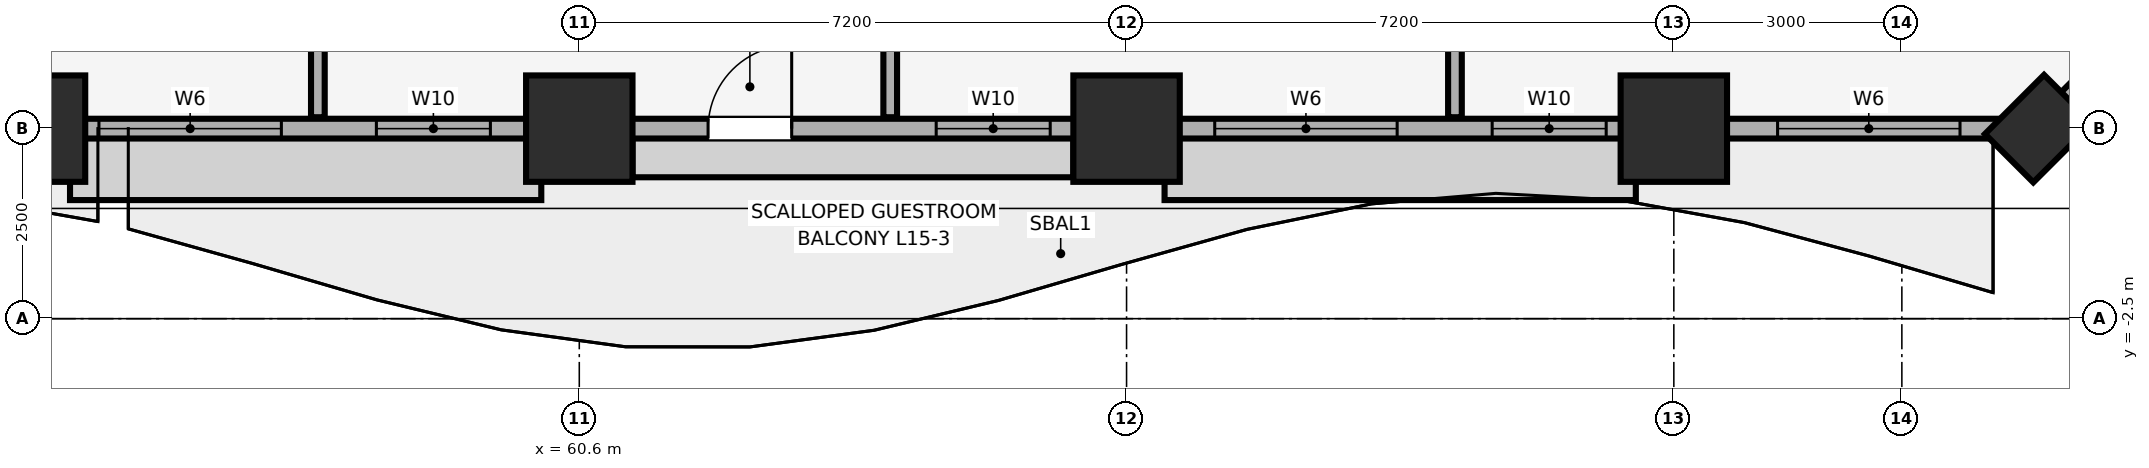
"""IFC4 building model, lengths in metres.
Left out: names, types, materials, properties, quantities, classifications, styles, units other than length and angle.
Written with IfcOpenShell. Run it as: python <this file> out.ifc"""

import sys

from ifc_helpers import new_model, si_unit, direction, frame, frame_2d, origin, origin_2d, place, context, subcontext, project, spatial, rectangle, extrude, element, fill, save


model = new_model("IFC4")
c1 = context("Model", 3, precision=1e-05, world=origin(), true_north=direction((0.0, 1.0)))
c2 = subcontext(c1, "Body", "Model", "MODEL_VIEW")
j1 = project(units=[si_unit("LENGTHUNIT", "METRE"), si_unit("PLANEANGLEUNIT", "RADIAN")], contexts=[c1])
p1 = place(None, origin())
s1 = spatial("IfcSite", under=j1, at=p1, CompositionType="ELEMENT")
p2 = place(p1, origin())
s2 = spatial("IfcBuilding", under=s1, at=p2, CompositionType="ELEMENT")
p3 = place(p2, frame((0.0, 0.0, 68.9)))
s3 = spatial("IfcBuildingStorey", under=s2, at=p3, CompositionType="ELEMENT", Elevation=68.9)
for number, where, z_axis, x_axis in (
    (1, (53.4, 0.0, 0.0), (0.0, 0.0, 1.0), (1.0, 0.0, 0.0)),
    (2, (60.6, 0.0, 0.0), (0.0, 0.0, 1.0), (1.0, 0.0, 0.0)),
    (3, (67.8, 0.0, 0.0), (0.0, 0.0, 1.0), (1.0, 0.0, 0.0)),
    (4, (75.0, 0.0, 0.0), (0.0, 0.0, 1.0), (1.0, 0.0, 0.0)),
):
    element("IfcColumn", number, at=place(p3, frame(where, z_axis=z_axis, x_axis=x_axis)), inside=s3, PredefinedType="COLUMN", context=c2, shape_type="SweptSolid", body=[
        extrude(rectangle(XDim=1.4, YDim=1.4, at=origin_2d()), origin(), (0.0, 0.0, 1.0), 3.51),
    ])
p4 = place(p3, frame((79.8, 0.0, 0.0), z_axis=(0.0, 0.0, 1.0), x_axis=(0.707106781187, 0.707106781187, 0.0)))
e5 = element("IfcColumn", 5, at=p4, inside=s3, PredefinedType="PILASTER", context=c2, shape_type="SweptSolid", body=[
    extrude(rectangle(XDim=1.1, YDim=0.9, at=origin_2d()), origin(), (0.0, 0.0, 1.0), 3.51),
])
p5 = place(p3, frame((4.2, 0.0, 0.0), z_axis=(0.0, 0.0, 1.0), x_axis=(1.0, 0.0, 0.0)))
e6 = element("IfcWall", 6, at=p5, inside=s3, PredefinedType="SOLIDWALL", context=c2, shape_type="SweptSolid", body=[
    extrude(rectangle(XDim=75.6, YDim=0.26, at=frame_2d((37.8, 0.0))), origin(), (0.0, 0.0, 1.0), 2.56),
])
p6 = place(p5, frame((13.517, 0.0, 0.0)))
e7 = element("IfcOpeningElement", 7, at=p6, cuts=e6, PredefinedType="OPENING", context=c2, shape_type="SweptSolid", body=[
    extrude(rectangle(XDim=1.1, YDim=2.15, at=frame_2d((0.55, 1.075))), frame((0.0, 0.14, 0.0), z_axis=(0.0, -1.0, 0.0), x_axis=(1.0, 0.0, 0.0)), (0.0, 0.0, 1.0), 0.28),
])
p7 = place(p5, frame((28.183, 0.0, 0.0)))
e8 = element("IfcOpeningElement", 8, at=p7, cuts=e6, PredefinedType="OPENING", context=c2, shape_type="SweptSolid", body=[
    extrude(rectangle(XDim=1.1, YDim=2.15, at=frame_2d((0.55, 1.075))), frame((0.0, 0.14, 0.0), z_axis=(0.0, -1.0, 0.0), x_axis=(1.0, 0.0, 0.0)), (0.0, 0.0, 1.0), 0.28),
])
p8 = place(p5, frame((58.094, 0.0, 0.0)))
e9 = element("IfcOpeningElement", 9, at=p8, cuts=e6, PredefinedType="OPENING", context=c2, shape_type="SweptSolid", body=[
    extrude(rectangle(XDim=1.1, YDim=2.15, at=frame_2d((0.55, 1.075))), frame((0.0, 0.14, 0.0), z_axis=(0.0, -1.0, 0.0), x_axis=(1.0, 0.0, 0.0)), (0.0, 0.0, 1.0), 0.28),
])
p9 = place(p5, frame((1.035, 0.0, 0.85)))
e10 = element("IfcOpeningElement", 10, at=p9, cuts=e6, PredefinedType="OPENING", context=c2, shape_type="SweptSolid", body=[
    extrude(rectangle(XDim=2.4, YDim=1.5, at=frame_2d((1.2, 0.75))), frame((0.0, 0.14, 0.0), z_axis=(0.0, -1.0, 0.0), x_axis=(1.0, 0.0, 0.0)), (0.0, 0.0, 1.0), 0.28),
])
p10 = place(p5, frame((5.74, 0.0, 0.85)))
e11 = element("IfcOpeningElement", 11, at=p10, cuts=e6, PredefinedType="OPENING", context=c2, shape_type="SweptSolid", body=[
    extrude(rectangle(XDim=1.5, YDim=1.4, at=frame_2d((0.75, 0.7))), frame((0.0, 0.14, 0.0), z_axis=(0.0, -1.0, 0.0), x_axis=(1.0, 0.0, 0.0)), (0.0, 0.0, 1.0), 0.28),
])
p11 = place(p5, frame((8.49, 0.0, 0.85)))
e12 = element("IfcOpeningElement", 12, at=p11, cuts=e6, PredefinedType="OPENING", context=c2, shape_type="SweptSolid", body=[
    extrude(rectangle(XDim=2.4, YDim=1.5, at=frame_2d((1.2, 0.75))), frame((0.0, 0.14, 0.0), z_axis=(0.0, -1.0, 0.0), x_axis=(1.0, 0.0, 0.0)), (0.0, 0.0, 1.0), 0.28),
])
p12 = place(p5, frame((15.855, 0.0, 0.85)))
e13 = element("IfcOpeningElement", 13, at=p12, cuts=e6, PredefinedType="OPENING", context=c2, shape_type="SweptSolid", body=[
    extrude(rectangle(XDim=2.4, YDim=1.5, at=frame_2d((1.2, 0.75))), frame((0.0, 0.14, 0.0), z_axis=(0.0, -1.0, 0.0), x_axis=(1.0, 0.0, 0.0)), (0.0, 0.0, 1.0), 0.28),
])
p13 = place(p5, frame((20.02, 0.0, 0.85)))
e14 = element("IfcOpeningElement", 14, at=p13, cuts=e6, PredefinedType="OPENING", context=c2, shape_type="SweptSolid", body=[
    extrude(rectangle(XDim=2.4, YDim=1.5, at=frame_2d((1.2, 0.75))), frame((0.0, 0.14, 0.0), z_axis=(0.0, -1.0, 0.0), x_axis=(1.0, 0.0, 0.0)), (0.0, 0.0, 1.0), 0.28),
])
p14 = place(p5, frame((23.67, 0.0, 0.85)))
e15 = element("IfcOpeningElement", 15, at=p14, cuts=e6, PredefinedType="OPENING", context=c2, shape_type="SweptSolid", body=[
    extrude(rectangle(XDim=1.5, YDim=1.4, at=frame_2d((0.75, 0.7))), frame((0.0, 0.14, 0.0), z_axis=(0.0, -1.0, 0.0), x_axis=(1.0, 0.0, 0.0)), (0.0, 0.0, 1.0), 0.28),
])
p15 = place(p5, frame((31.035, 0.0, 0.85)))
e16 = element("IfcOpeningElement", 16, at=p15, cuts=e6, PredefinedType="OPENING", context=c2, shape_type="SweptSolid", body=[
    extrude(rectangle(XDim=1.5, YDim=1.4, at=frame_2d((0.75, 0.7))), frame((0.0, 0.14, 0.0), z_axis=(0.0, -1.0, 0.0), x_axis=(1.0, 0.0, 0.0)), (0.0, 0.0, 1.0), 0.28),
])
p16 = place(p5, frame((34.75, 0.0, 0.85)))
e17 = element("IfcOpeningElement", 17, at=p16, cuts=e6, PredefinedType="OPENING", context=c2, shape_type="SweptSolid", body=[
    extrude(rectangle(XDim=2.4, YDim=1.5, at=frame_2d((1.2, 0.75))), frame((0.0, 0.14, 0.0), z_axis=(0.0, -1.0, 0.0), x_axis=(1.0, 0.0, 0.0)), (0.0, 0.0, 1.0), 0.28),
])
p17 = place(p5, frame((38.55, 0.0, 0.85)))
e18 = element("IfcOpeningElement", 18, at=p17, cuts=e6, PredefinedType="OPENING", context=c2, shape_type="SweptSolid", body=[
    extrude(rectangle(XDim=2.4, YDim=1.5, at=frame_2d((1.2, 0.75))), frame((0.0, 0.14, 0.0), z_axis=(0.0, -1.0, 0.0), x_axis=(1.0, 0.0, 0.0)), (0.0, 0.0, 1.0), 0.28),
])
p18 = place(p5, frame((43.165, 0.0, 0.85)))
e19 = element("IfcOpeningElement", 19, at=p18, cuts=e6, PredefinedType="OPENING", context=c2, shape_type="SweptSolid", body=[
    extrude(rectangle(XDim=1.5, YDim=1.4, at=frame_2d((0.75, 0.7))), frame((0.0, 0.14, 0.0), z_axis=(0.0, -1.0, 0.0), x_axis=(1.0, 0.0, 0.0)), (0.0, 0.0, 1.0), 0.28),
])
p19 = place(p5, frame((45.915, 0.0, 0.85)))
e20 = element("IfcOpeningElement", 20, at=p19, cuts=e6, PredefinedType="OPENING", context=c2, shape_type="SweptSolid", body=[
    extrude(rectangle(XDim=2.4, YDim=1.5, at=frame_2d((1.2, 0.75))), frame((0.0, 0.14, 0.0), z_axis=(0.0, -1.0, 0.0), x_axis=(1.0, 0.0, 0.0)), (0.0, 0.0, 1.0), 0.28),
])
p20 = place(p5, frame((50.081, 0.0, 0.85)))
e21 = element("IfcOpeningElement", 21, at=p20, cuts=e6, PredefinedType="OPENING", context=c2, shape_type="SweptSolid", body=[
    extrude(rectangle(XDim=2.4, YDim=1.5, at=frame_2d((1.2, 0.75))), frame((0.0, 0.14, 0.0), z_axis=(0.0, -1.0, 0.0), x_axis=(1.0, 0.0, 0.0)), (0.0, 0.0, 1.0), 0.28),
])
p21 = place(p5, frame((53.73, 0.0, 0.85)))
e22 = element("IfcOpeningElement", 22, at=p21, cuts=e6, PredefinedType="OPENING", context=c2, shape_type="SweptSolid", body=[
    extrude(rectangle(XDim=1.5, YDim=1.4, at=frame_2d((0.75, 0.7))), frame((0.0, 0.14, 0.0), z_axis=(0.0, -1.0, 0.0), x_axis=(1.0, 0.0, 0.0)), (0.0, 0.0, 1.0), 0.28),
])
p22 = place(p5, frame((61.095, 0.0, 0.85)))
e23 = element("IfcOpeningElement", 23, at=p22, cuts=e6, PredefinedType="OPENING", context=c2, shape_type="SweptSolid", body=[
    extrude(rectangle(XDim=1.5, YDim=1.4, at=frame_2d((0.75, 0.7))), frame((0.0, 0.14, 0.0), z_axis=(0.0, -1.0, 0.0), x_axis=(1.0, 0.0, 0.0)), (0.0, 0.0, 1.0), 0.28),
])
p23 = place(p5, frame((64.76, 0.0, 0.85)))
e24 = element("IfcOpeningElement", 24, at=p23, cuts=e6, PredefinedType="OPENING", context=c2, shape_type="SweptSolid", body=[
    extrude(rectangle(XDim=2.4, YDim=1.5, at=frame_2d((1.2, 0.75))), frame((0.0, 0.14, 0.0), z_axis=(0.0, -1.0, 0.0), x_axis=(1.0, 0.0, 0.0)), (0.0, 0.0, 1.0), 0.28),
])
p24 = place(p5, frame((68.41, 0.0, 0.85)))
e25 = element("IfcOpeningElement", 25, at=p24, cuts=e6, PredefinedType="OPENING", context=c2, shape_type="SweptSolid", body=[
    extrude(rectangle(XDim=1.5, YDim=1.4, at=frame_2d((0.75, 0.7))), frame((0.0, 0.14, 0.0), z_axis=(0.0, -1.0, 0.0), x_axis=(1.0, 0.0, 0.0)), (0.0, 0.0, 1.0), 0.28),
])
p25 = place(p5, frame((72.165, 0.0, 0.85)))
e26 = element("IfcOpeningElement", 26, at=p25, cuts=e6, PredefinedType="OPENING", context=c2, shape_type="SweptSolid", body=[
    extrude(rectangle(XDim=2.4, YDim=1.5, at=frame_2d((1.2, 0.75))), frame((0.0, 0.14, 0.0), z_axis=(0.0, -1.0, 0.0), x_axis=(1.0, 0.0, 0.0)), (0.0, 0.0, 1.0), 0.28),
])
p26 = place(p3, frame((79.8, 0.0, 0.0), z_axis=(0.0, 0.0, 1.0), x_axis=(0.707106781187, 0.707106781187, 0.0)))
e27 = element("IfcWall", 27, at=p26, inside=s3, PredefinedType="SOLIDWALL", context=c2, shape_type="SweptSolid", body=[
    extrude(rectangle(XDim=5.94, YDim=0.26, at=frame_2d((2.97, 0.0))), origin(), (0.0, 0.0, 1.0), 2.56),
])
p27 = place(p3, frame((57.161, 0.15, 0.0), z_axis=(0.0, 0.0, 1.0), x_axis=(0.0, 1.0, 0.0)))
e28 = element("IfcWall", 28, at=p27, inside=s3, PredefinedType="PARTITIONING", context=c2, shape_type="SweptSolid", body=[
    extrude(rectangle(XDim=12.755, YDim=0.18, at=frame_2d((6.377, 0.0))), origin(), (0.0, 0.0, 1.0), 2.898),
])
for number, where, z_axis, x_axis in (
    (29, (64.691, 0.15, 0.0), (0.0, 0.0, 1.0), (0.0, 1.0, 0.0)),
    (30, (72.12, 0.15, 0.0), (0.0, 0.0, 1.0), (0.0, 1.0, 0.0)),
):
    element("IfcWall", number, at=place(p3, frame(where, z_axis=z_axis, x_axis=x_axis)), inside=s3, PredefinedType="PARTITIONING", context=c2, shape_type="SweptSolid", body=[
        extrude(rectangle(XDim=12.755, YDim=0.18, at=frame_2d((6.377, 0.0))), origin(), (0.0, 0.0, 1.0), 3.51),
    ])
p28 = place(p8, origin())
e31 = element("IfcDoor", 31, at=p28, inside=s3, OperationType="SINGLE_SWING_RIGHT", PredefinedType="DOOR", context=c2, shape_type="SweptSolid", body=[
    extrude(rectangle(XDim=1.1, YDim=2.15, at=frame_2d((0.55, 1.075))), frame((0.0, 0.025, 0.0), z_axis=(0.0, -1.0, 0.0), x_axis=(1.0, 0.0, 0.0)), (0.0, 0.0, 1.0), 0.05),
])
fill(e9, e31)
p29 = place(p20, origin())
e32 = element("IfcWindow", 32, at=p29, inside=s3, PartitioningType="SINGLE_PANEL", PredefinedType="WINDOW", context=c2, shape_type="SweptSolid", body=[
    extrude(rectangle(XDim=2.4, YDim=1.5, at=frame_2d((1.2, 0.75))), frame((0.0, 0.03, 0.0), z_axis=(0.0, -1.0, 0.0), x_axis=(1.0, 0.0, 0.0)), (0.0, 0.0, 1.0), 0.06),
])
fill(e21, e32)
p30 = place(p21, origin())
e33 = element("IfcWindow", 33, at=p30, inside=s3, PartitioningType="SINGLE_PANEL", PredefinedType="WINDOW", context=c2, shape_type="SweptSolid", body=[
    extrude(rectangle(XDim=1.5, YDim=1.4, at=frame_2d((0.75, 0.7))), frame((0.0, 0.03, 0.0), z_axis=(0.0, -1.0, 0.0), x_axis=(1.0, 0.0, 0.0)), (0.0, 0.0, 1.0), 0.06),
])
fill(e22, e33)
p31 = place(p22, origin())
e34 = element("IfcWindow", 34, at=p31, inside=s3, PartitioningType="SINGLE_PANEL", PredefinedType="WINDOW", context=c2, shape_type="SweptSolid", body=[
    extrude(rectangle(XDim=1.5, YDim=1.4, at=frame_2d((0.75, 0.7))), frame((0.0, 0.03, 0.0), z_axis=(0.0, -1.0, 0.0), x_axis=(1.0, 0.0, 0.0)), (0.0, 0.0, 1.0), 0.06),
])
fill(e23, e34)
p32 = place(p23, origin())
e35 = element("IfcWindow", 35, at=p32, inside=s3, PartitioningType="SINGLE_PANEL", PredefinedType="WINDOW", context=c2, shape_type="SweptSolid", body=[
    extrude(rectangle(XDim=2.4, YDim=1.5, at=frame_2d((1.2, 0.75))), frame((0.0, 0.03, 0.0), z_axis=(0.0, -1.0, 0.0), x_axis=(1.0, 0.0, 0.0)), (0.0, 0.0, 1.0), 0.06),
])
fill(e24, e35)
p33 = place(p24, origin())
e36 = element("IfcWindow", 36, at=p33, inside=s3, PartitioningType="SINGLE_PANEL", PredefinedType="WINDOW", context=c2, shape_type="SweptSolid", body=[
    extrude(rectangle(XDim=1.5, YDim=1.4, at=frame_2d((0.75, 0.7))), frame((0.0, 0.03, 0.0), z_axis=(0.0, -1.0, 0.0), x_axis=(1.0, 0.0, 0.0)), (0.0, 0.0, 1.0), 0.06),
])
fill(e25, e36)
p34 = place(p25, origin())
e37 = element("IfcWindow", 37, at=p34, inside=s3, PartitioningType="SINGLE_PANEL", PredefinedType="WINDOW", context=c2, shape_type="SweptSolid", body=[
    extrude(rectangle(XDim=2.4, YDim=1.5, at=frame_2d((1.2, 0.75))), frame((0.0, 0.03, 0.0), z_axis=(0.0, -1.0, 0.0), x_axis=(1.0, 0.0, 0.0)), (0.0, 0.0, 1.0), 0.06),
])
fill(e26, e37)
save(model, sys.argv[1])
